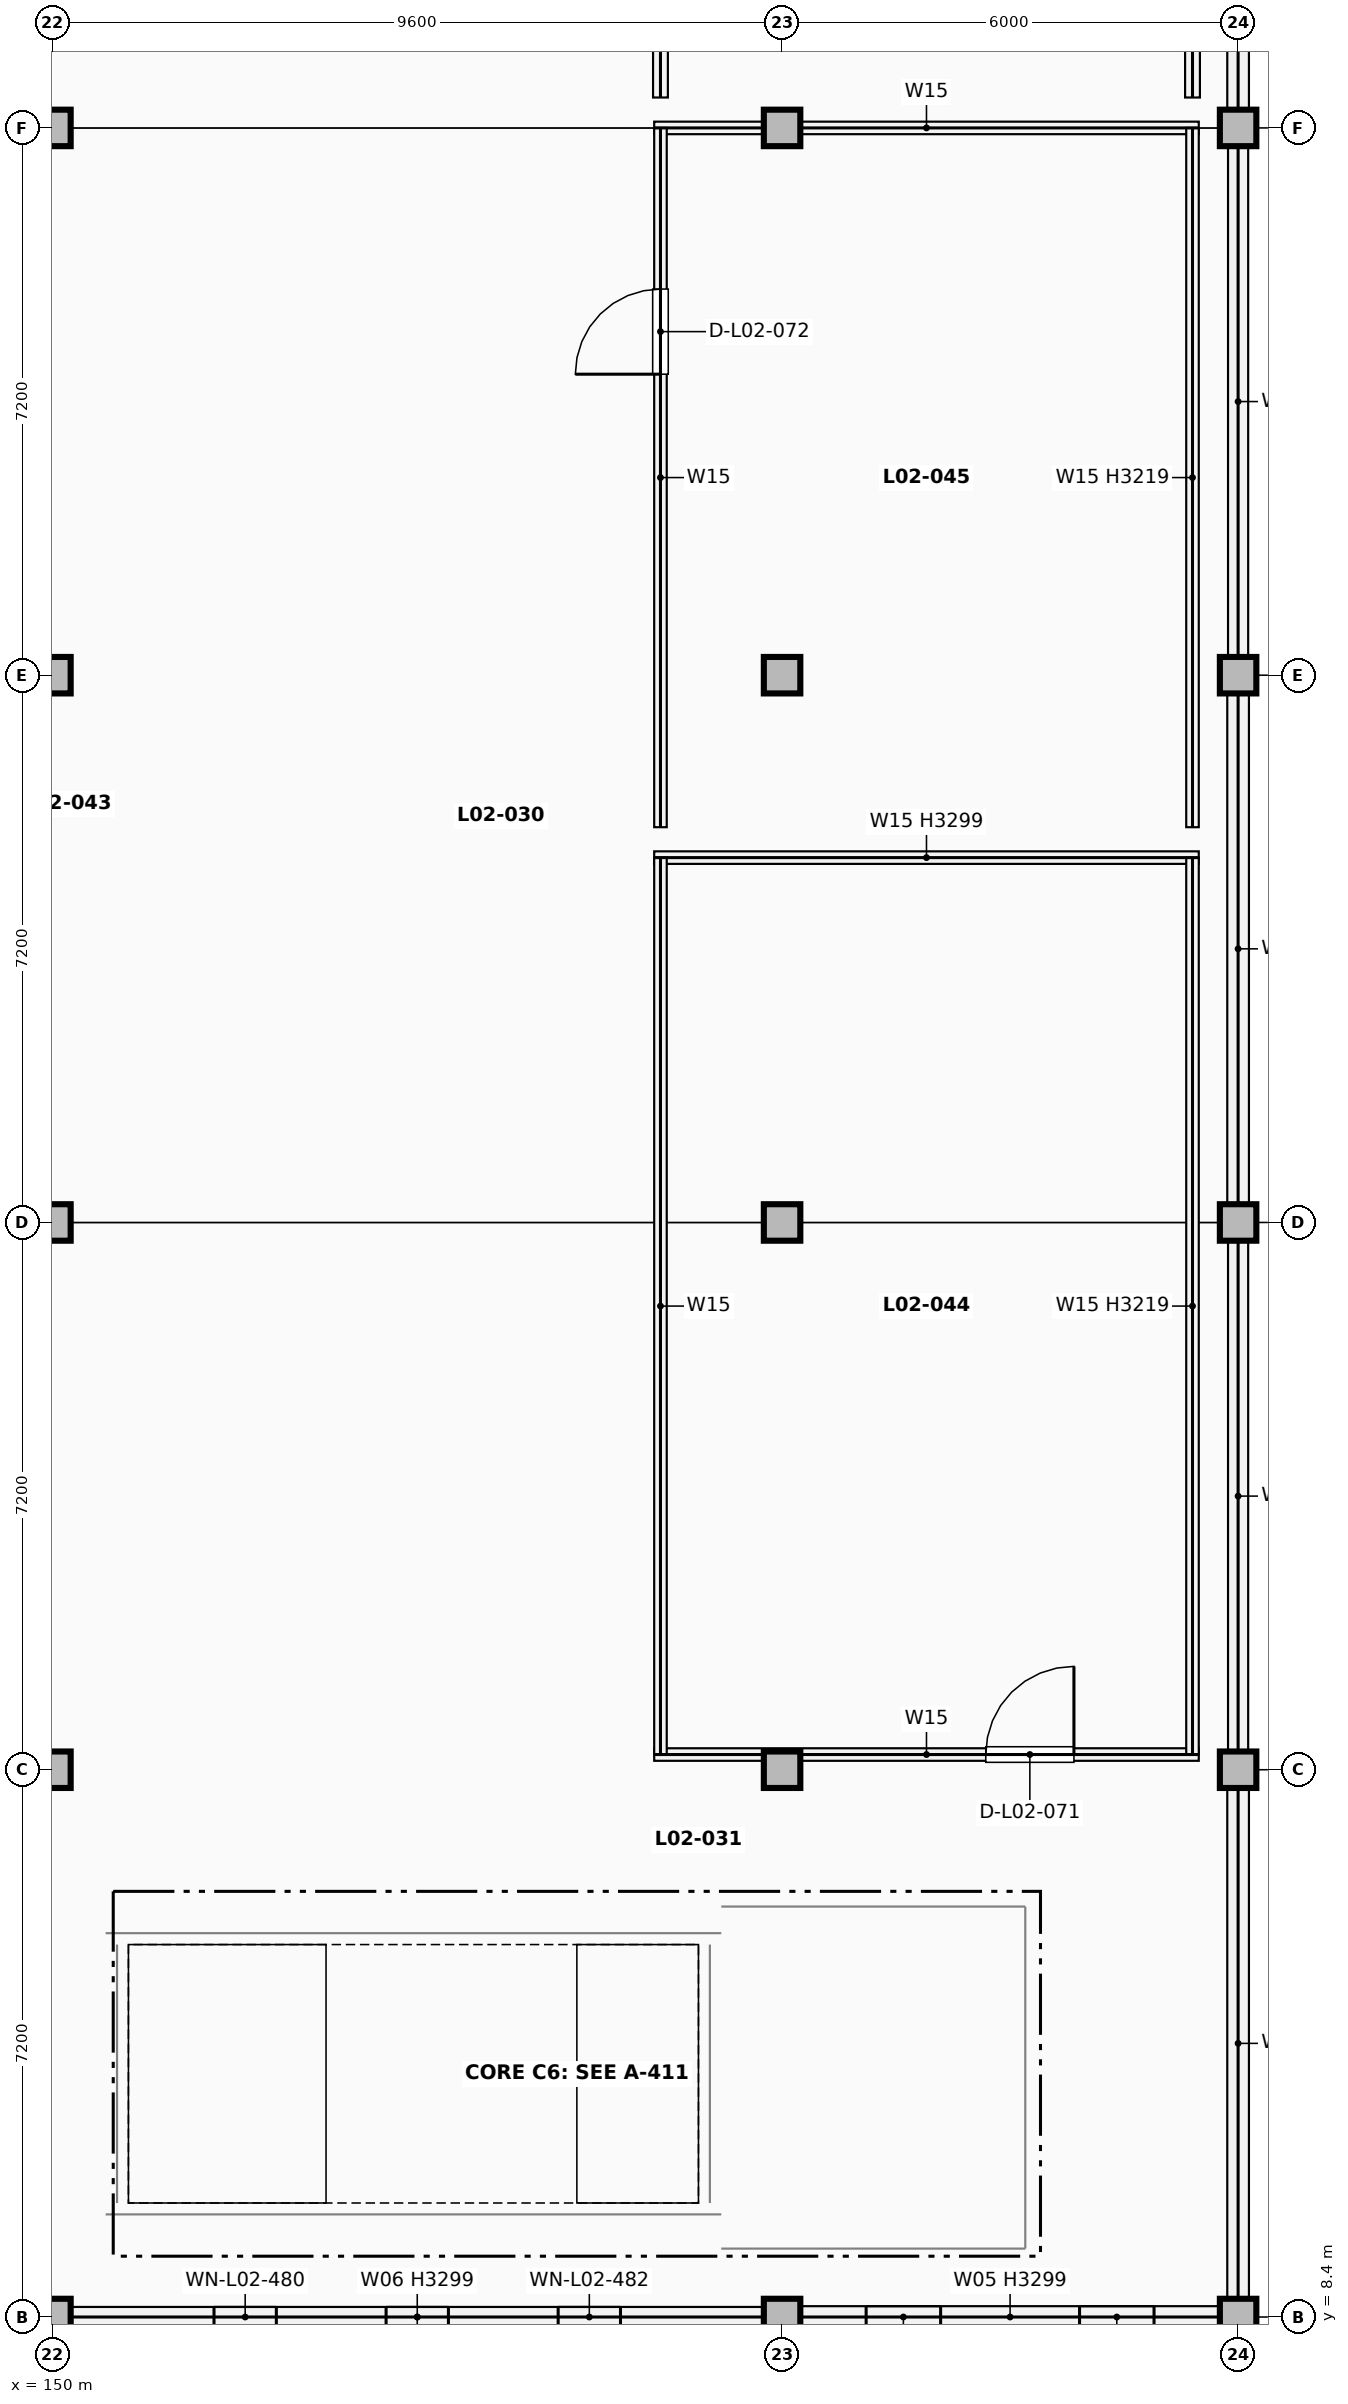
"""IFC4 building model, lengths in metres.
Left out: names, types, materials, properties, quantities, classifications, styles, units other than length and angle.
Written with IfcOpenShell. Run it as: python <this file> out.ifc"""

import sys

from ifc_helpers import new_model, si_unit, direction, frame, frame_2d, origin, origin_2d, place, context, subcontext, project, spatial, rectangle, extrude, element, fill, save


model = new_model("IFC4")
c1 = context("Model", 3, precision=1e-05, world=origin(), true_north=direction((0.0, 1.0)))
c2 = subcontext(c1, "Body", "Model", "MODEL_VIEW")
j1 = project(units=[si_unit("LENGTHUNIT", "METRE"), si_unit("PLANEANGLEUNIT", "RADIAN")], contexts=[c1])
p1 = place(None, origin())
s1 = spatial("IfcSite", under=j1, at=p1, CompositionType="ELEMENT")
p2 = place(p1, origin())
s2 = spatial("IfcBuilding", under=s1, at=p2, CompositionType="ELEMENT")
p3 = place(p2, frame((0.0, 0.0, 9.52)))
s3 = spatial("IfcBuildingStorey", under=s2, at=p3, CompositionType="ELEMENT", Elevation=9.52)
for number, where, z_axis, x_axis in (
    (1, (150.0, 8.4, 0.0), (0.0, 0.0, 1.0), (1.0, 0.0, 0.0)),
    (2, (150.0, 15.6, 0.0), (0.0, 0.0, 1.0), (1.0, 0.0, 0.0)),
    (3, (150.0, 22.8, 0.0), (0.0, 0.0, 1.0), (1.0, 0.0, 0.0)),
    (4, (150.0, 30.0, 0.0), (0.0, 0.0, 1.0), (1.0, 0.0, 0.0)),
    (5, (150.0, 37.2, 0.0), (0.0, 0.0, 1.0), (1.0, 0.0, 0.0)),
    (6, (159.6, 8.4, 0.0), (0.0, 0.0, 1.0), (1.0, 0.0, 0.0)),
    (7, (159.6, 15.6, 0.0), (0.0, 0.0, 1.0), (1.0, 0.0, 0.0)),
    (8, (159.6, 22.8, 0.0), (0.0, 0.0, 1.0), (1.0, 0.0, 0.0)),
    (9, (159.6, 30.0, 0.0), (0.0, 0.0, 1.0), (1.0, 0.0, 0.0)),
    (10, (159.6, 37.2, 0.0), (0.0, 0.0, 1.0), (1.0, 0.0, 0.0)),
    (11, (165.6, 8.4, 0.0), (0.0, 0.0, 1.0), (1.0, 0.0, 0.0)),
    (12, (165.6, 15.6, 0.0), (0.0, 0.0, 1.0), (1.0, 0.0, 0.0)),
    (13, (165.6, 22.8, 0.0), (0.0, 0.0, 1.0), (1.0, 0.0, 0.0)),
    (14, (165.6, 30.0, 0.0), (0.0, 0.0, 1.0), (1.0, 0.0, 0.0)),
    (15, (165.6, 37.2, 0.0), (0.0, 0.0, 1.0), (1.0, 0.0, 0.0)),
):
    element("IfcColumn", number, at=place(p3, frame(where, z_axis=z_axis, x_axis=x_axis)), inside=s3, PredefinedType="COLUMN", context=c2, shape_type="SweptSolid", body=[
        extrude(rectangle(XDim=0.48, YDim=0.48, at=origin_2d()), origin(), (0.0, 0.0, 1.0), 4.08),
    ])
p4 = place(p3, frame((165.6, 8.642, 0.0), z_axis=(0.0, 0.0, 1.0), x_axis=(0.0, 1.0, 0.0)))
e16 = element("IfcWall", 16, at=p4, inside=s3, PredefinedType="SOLIDWALL", context=c2, shape_type="SweptSolid", body=[
    extrude(rectangle(XDim=6.716, YDim=0.285, at=frame_2d((3.358, 0.0))), origin(), (0.0, 0.0, 1.0), 3.219),
])
p5 = place(p3, frame((165.6, 15.842, 0.0), z_axis=(0.0, 0.0, 1.0), x_axis=(0.0, 1.0, 0.0)))
e17 = element("IfcWall", 17, at=p5, inside=s3, PredefinedType="SOLIDWALL", context=c2, shape_type="SweptSolid", body=[
    extrude(rectangle(XDim=6.716, YDim=0.265, at=frame_2d((3.358, 0.0))), origin(), (0.0, 0.0, 1.0), 3.219),
])
p6 = place(p3, frame((165.6, 23.042, 0.0), z_axis=(0.0, 0.0, 1.0), x_axis=(0.0, 1.0, 0.0)))
e18 = element("IfcWall", 18, at=p6, inside=s3, PredefinedType="SOLIDWALL", context=c2, shape_type="SweptSolid", body=[
    extrude(rectangle(XDim=6.716, YDim=0.285, at=frame_2d((3.358, 0.0))), origin(), (0.0, 0.0, 1.0), 3.219),
])
p7 = place(p3, frame((165.6, 30.242, 0.0), z_axis=(0.0, 0.0, 1.0), x_axis=(0.0, 1.0, 0.0)))
e19 = element("IfcWall", 19, at=p7, inside=s3, PredefinedType="SOLIDWALL", context=c2, shape_type="SweptSolid", body=[
    extrude(rectangle(XDim=6.716, YDim=0.265, at=frame_2d((3.358, 0.0))), origin(), (0.0, 0.0, 1.0), 3.219),
])
p8 = place(p3, frame((165.6, 37.442, 0.0), z_axis=(0.0, 0.0, 1.0), x_axis=(0.0, 1.0, 0.0)))
e20 = element("IfcWall", 20, at=p8, inside=s3, PredefinedType="SOLIDWALL", context=c2, shape_type="SweptSolid", body=[
    extrude(rectangle(XDim=6.716, YDim=0.285, at=frame_2d((3.358, 0.0))), origin(), (0.0, 0.0, 1.0), 3.219),
])
p9 = place(p3, frame((150.242, 8.4, 0.0), z_axis=(0.0, 0.0, 1.0), x_axis=(1.0, 0.0, 0.0)))
e21 = element("IfcWall", 21, at=p9, inside=s3, PredefinedType="SOLIDWALL", context=c2, shape_type="SweptSolid", body=[
    extrude(rectangle(XDim=9.116, YDim=0.265, at=frame_2d((4.558, 0.0))), origin(), (0.0, 0.0, 1.0), 3.299),
])
p10 = place(p9, frame((1.884, 0.0, 0.75)))
e22 = element("IfcOpeningElement", 22, at=p10, cuts=e21, PredefinedType="OPENING", context=c2, shape_type="SweptSolid", body=[
    extrude(rectangle(XDim=0.82, YDim=2.22, at=frame_2d((0.41, 1.11))), frame((0.0, 0.143, 0.0), z_axis=(0.0, -1.0, 0.0), x_axis=(1.0, 0.0, 0.0)), (0.0, 0.0, 1.0), 0.285),
])
p11 = place(p9, frame((4.148, 0.0, 0.75)))
e23 = element("IfcOpeningElement", 23, at=p11, cuts=e21, PredefinedType="OPENING", context=c2, shape_type="SweptSolid", body=[
    extrude(rectangle(XDim=0.82, YDim=2.22, at=frame_2d((0.41, 1.11))), frame((0.0, 0.143, 0.0), z_axis=(0.0, -1.0, 0.0), x_axis=(1.0, 0.0, 0.0)), (0.0, 0.0, 1.0), 0.285),
])
p12 = place(p9, frame((6.412, 0.0, 0.75)))
e24 = element("IfcOpeningElement", 24, at=p12, cuts=e21, PredefinedType="OPENING", context=c2, shape_type="SweptSolid", body=[
    extrude(rectangle(XDim=0.82, YDim=2.22, at=frame_2d((0.41, 1.11))), frame((0.0, 0.143, 0.0), z_axis=(0.0, -1.0, 0.0), x_axis=(1.0, 0.0, 0.0)), (0.0, 0.0, 1.0), 0.285),
])
p13 = place(p3, frame((159.842, 8.4, 0.0), z_axis=(0.0, 0.0, 1.0), x_axis=(1.0, 0.0, 0.0)))
e25 = element("IfcWall", 25, at=p13, inside=s3, PredefinedType="SOLIDWALL", context=c2, shape_type="SweptSolid", body=[
    extrude(rectangle(XDim=5.516, YDim=0.285, at=frame_2d((2.758, 0.0))), origin(), (0.0, 0.0, 1.0), 3.299),
])
p14 = place(p13, frame((0.864, 0.0, 0.75)))
e26 = element("IfcOpeningElement", 26, at=p14, cuts=e25, PredefinedType="OPENING", context=c2, shape_type="SweptSolid", body=[
    extrude(rectangle(XDim=0.98, YDim=2.28, at=frame_2d((0.49, 1.14))), frame((0.0, 0.152, 0.0), z_axis=(0.0, -1.0, 0.0), x_axis=(1.0, 0.0, 0.0)), (0.0, 0.0, 1.0), 0.305),
])
p15 = place(p13, frame((3.672, 0.0, 0.75)))
e27 = element("IfcOpeningElement", 27, at=p15, cuts=e25, PredefinedType="OPENING", context=c2, shape_type="SweptSolid", body=[
    extrude(rectangle(XDim=0.98, YDim=2.28, at=frame_2d((0.49, 1.14))), frame((0.0, 0.152, 0.0), z_axis=(0.0, -1.0, 0.0), x_axis=(1.0, 0.0, 0.0)), (0.0, 0.0, 1.0), 0.305),
])
p16 = place(p3, frame((150.85, 9.9, 0.0), z_axis=(0.0, 0.0, 1.0), x_axis=(0.0, 1.0, 0.0)))
e28 = element("IfcWall", 28, at=p16, inside=s3, PredefinedType="SHEAR", context=c2, shape_type="SweptSolid", body=[
    extrude(rectangle(XDim=3.4, YDim=0.3, at=frame_2d((1.7, 0.0))), origin(), (0.0, 0.0, 1.0), 4.08),
])
for number, where, z_axis, x_axis in (
    (29, (150.7, 9.75, 0.0), (0.0, 0.0, 1.0), (1.0, 0.0, 0.0)),
    (30, (150.7, 13.45, 0.0), (0.0, 0.0, 1.0), (1.0, 0.0, 0.0)),
):
    element("IfcWall", number, at=place(p3, frame(where, z_axis=z_axis, x_axis=x_axis)), inside=s3, PredefinedType="SHEAR", context=c2, shape_type="SweptSolid", body=[
        extrude(rectangle(XDim=8.1, YDim=0.3, at=frame_2d((4.05, 0.0))), origin(), (0.0, 0.0, 1.0), 4.08),
    ])
p17 = place(p3, frame((158.65, 9.9, 0.0), z_axis=(0.0, 0.0, 1.0), x_axis=(0.0, 1.0, 0.0)))
e31 = element("IfcWall", 31, at=p17, inside=s3, PredefinedType="SHEAR", context=c2, shape_type="SweptSolid", body=[
    extrude(rectangle(XDim=3.4, YDim=0.3, at=frame_2d((1.7, 0.0))), origin(), (0.0, 0.0, 1.0), 4.08),
])
p18 = place(p17, frame((1.1, 0.0, 0.0)))
e32 = element("IfcOpeningElement", 32, at=p18, cuts=e31, PredefinedType="OPENING", context=c2, shape_type="SweptSolid", body=[
    extrude(rectangle(XDim=1.2, YDim=2.2, at=frame_2d((0.6, 1.1))), frame((0.0, 0.16, 0.0), z_axis=(0.0, -1.0, 0.0), x_axis=(1.0, 0.0, 0.0)), (0.0, 0.0, 1.0), 0.32),
])
p19 = place(p3, frame((162.8, 9.3, 0.0), z_axis=(0.0, 0.0, 1.0), x_axis=(0.0, 1.0, 0.0)))
e33 = element("IfcWall", 33, at=p19, inside=s3, PredefinedType="PARTITIONING", context=c2, shape_type="SweptSolid", body=[
    extrude(rectangle(XDim=4.5, YDim=0.2, at=frame_2d((2.25, 0.0))), origin(), (0.0, 0.0, 1.0), 3.299),
])
p20 = place(p3, frame((158.8, 9.3, 0.0), z_axis=(0.0, 0.0, 1.0), x_axis=(1.0, 0.0, 0.0)))
e34 = element("IfcWall", 34, at=p20, inside=s3, PredefinedType="PARTITIONING", context=c2, shape_type="SweptSolid", body=[
    extrude(rectangle(XDim=4.0, YDim=0.2, at=frame_2d((2.0, 0.0))), origin(), (0.0, 0.0, 1.0), 3.299),
])
p21 = place(p3, frame((158.8, 13.8, 0.0), z_axis=(0.0, 0.0, 1.0), x_axis=(1.0, 0.0, 0.0)))
e35 = element("IfcWall", 35, at=p21, inside=s3, PredefinedType="PARTITIONING", context=c2, shape_type="SweptSolid", body=[
    extrude(rectangle(XDim=4.0, YDim=0.2, at=frame_2d((2.0, 0.0))), origin(), (0.0, 0.0, 1.0), 3.299),
])
p22 = place(p21, frame((1.275, 0.0, 0.0)))
e36 = element("IfcOpeningElement", 36, at=p22, cuts=e35, PredefinedType="OPENING", context=c2, shape_type="SweptSolid", body=[
    extrude(rectangle(XDim=1.45, YDim=2.2, at=frame_2d((0.725, 1.1))), frame((0.0, 0.11, 0.0), z_axis=(0.0, -1.0, 0.0), x_axis=(1.0, 0.0, 0.0)), (0.0, 0.0, 1.0), 0.22),
])
p23 = place(p3, frame((157.917, 15.8, 0.0), z_axis=(0.0, 0.0, 1.0), x_axis=(1.0, 0.0, 0.0)))
e37 = element("IfcWall", 37, at=p23, inside=s3, PredefinedType="PARTITIONING", context=c2, shape_type="SweptSolid", body=[
    extrude(rectangle(XDim=7.165, YDim=0.165, at=frame_2d((3.583, 0.0))), origin(), (0.0, 0.0, 1.0), 2.979),
])
p24 = place(p23, frame((4.363, 0.0, 0.0)))
e38 = element("IfcOpeningElement", 38, at=p24, cuts=e37, PredefinedType="OPENING", context=c2, shape_type="SweptSolid", body=[
    extrude(rectangle(XDim=1.16, YDim=2.22, at=frame_2d((0.58, 1.11))), frame((0.0, 0.093, 0.0), z_axis=(0.0, -1.0, 0.0), x_axis=(1.0, 0.0, 0.0)), (0.0, 0.0, 1.0), 0.185),
])
p25 = place(p3, frame((157.917, 27.6, 0.0), z_axis=(0.0, 0.0, 1.0), x_axis=(1.0, 0.0, 0.0)))
e39 = element("IfcWall", 39, at=p25, inside=s3, PredefinedType="PARTITIONING", context=c2, shape_type="SweptSolid", body=[
    extrude(rectangle(XDim=7.165, YDim=0.165, at=frame_2d((3.583, 0.0))), origin(), (0.0, 0.0, 1.0), 3.299),
])
p26 = place(p3, frame((158.0, 15.8, 0.0), z_axis=(0.0, 0.0, 1.0), x_axis=(0.0, 1.0, 0.0)))
e40 = element("IfcWall", 40, at=p26, inside=s3, PredefinedType="PARTITIONING", context=c2, shape_type="SweptSolid", body=[
    extrude(rectangle(XDim=11.8, YDim=0.165, at=frame_2d((5.9, 0.0))), origin(), (0.0, 0.0, 1.0), 2.979),
])
p27 = place(p3, frame((165.0, 15.8, 0.0), z_axis=(0.0, 0.0, 1.0), x_axis=(0.0, 1.0, 0.0)))
e41 = element("IfcWall", 41, at=p27, inside=s3, PredefinedType="PARTITIONING", context=c2, shape_type="SweptSolid", body=[
    extrude(rectangle(XDim=11.8, YDim=0.165, at=frame_2d((5.9, 0.0))), origin(), (0.0, 0.0, 1.0), 3.219),
])
p28 = place(p3, frame((157.917, 37.2, 0.0), z_axis=(0.0, 0.0, 1.0), x_axis=(1.0, 0.0, 0.0)))
e42 = element("IfcWall", 42, at=p28, inside=s3, PredefinedType="PARTITIONING", context=c2, shape_type="SweptSolid", body=[
    extrude(rectangle(XDim=7.165, YDim=0.165, at=frame_2d((3.583, 0.0))), origin(), (0.0, 0.0, 1.0), 2.979),
])
p29 = place(p3, frame((158.0, 28.0, 0.0), z_axis=(0.0, 0.0, 1.0), x_axis=(0.0, 1.0, 0.0)))
e43 = element("IfcWall", 43, at=p29, inside=s3, PredefinedType="PARTITIONING", context=c2, shape_type="SweptSolid", body=[
    extrude(rectangle(XDim=9.2, YDim=0.165, at=frame_2d((4.6, 0.0))), origin(), (0.0, 0.0, 1.0), 2.979),
])
p30 = place(p29, frame((5.96, 0.0, 0.0)))
e44 = element("IfcOpeningElement", 44, at=p30, cuts=e43, PredefinedType="OPENING", context=c2, shape_type="SweptSolid", body=[
    extrude(rectangle(XDim=1.12, YDim=2.22, at=frame_2d((0.56, 1.11))), frame((0.0, 0.093, 0.0), z_axis=(0.0, -1.0, 0.0), x_axis=(1.0, 0.0, 0.0)), (0.0, 0.0, 1.0), 0.185),
])
p31 = place(p3, frame((165.0, 28.0, 0.0), z_axis=(0.0, 0.0, 1.0), x_axis=(0.0, 1.0, 0.0)))
e45 = element("IfcWall", 45, at=p31, inside=s3, PredefinedType="PARTITIONING", context=c2, shape_type="SweptSolid", body=[
    extrude(rectangle(XDim=9.2, YDim=0.165, at=frame_2d((4.6, 0.0))), origin(), (0.0, 0.0, 1.0), 3.219),
])
p32 = place(p3, frame((158.0, 37.6, 0.0), z_axis=(0.0, 0.0, 1.0), x_axis=(0.0, 1.0, 0.0)))
e46 = element("IfcWall", 46, at=p32, inside=s3, PredefinedType="PARTITIONING", context=c2, shape_type="SweptSolid", body=[
    extrude(rectangle(XDim=6.4, YDim=0.195, at=frame_2d((3.2, 0.0))), origin(), (0.0, 0.0, 1.0), 3.754),
])
p33 = place(p32, frame((2.675, 0.0, 0.0)))
e47 = element("IfcOpeningElement", 47, at=p33, cuts=e46, PredefinedType="OPENING", context=c2, shape_type="SweptSolid", body=[
    extrude(rectangle(XDim=1.05, YDim=2.15, at=frame_2d((0.525, 1.075))), frame((0.0, 0.107, 0.0), z_axis=(0.0, -1.0, 0.0), x_axis=(1.0, 0.0, 0.0)), (0.0, 0.0, 1.0), 0.215),
])
p34 = place(p3, frame((165.0, 37.6, 0.0), z_axis=(0.0, 0.0, 1.0), x_axis=(0.0, 1.0, 0.0)))
e48 = element("IfcWall", 48, at=p34, inside=s3, PredefinedType="PARTITIONING", context=c2, shape_type="SweptSolid", body=[
    extrude(rectangle(XDim=6.4, YDim=0.195, at=frame_2d((3.2, 0.0))), origin(), (0.0, 0.0, 1.0), 3.754),
])
p35 = place(p10, origin())
e49 = element("IfcWindow", 49, at=p35, inside=s3, PartitioningType="SINGLE_PANEL", PredefinedType="WINDOW", context=c2, shape_type="SweptSolid", body=[
    extrude(rectangle(XDim=0.82, YDim=2.22, at=frame_2d((0.41, 1.11))), frame((0.0, 0.03, 0.0), z_axis=(0.0, -1.0, 0.0), x_axis=(1.0, 0.0, 0.0)), (0.0, 0.0, 1.0), 0.06),
])
fill(e22, e49)
p36 = place(p11, origin())
e50 = element("IfcWindow", 50, at=p36, inside=s3, PartitioningType="SINGLE_PANEL", PredefinedType="WINDOW", context=c2, shape_type="SweptSolid", body=[
    extrude(rectangle(XDim=0.82, YDim=2.22, at=frame_2d((0.41, 1.11))), frame((0.0, 0.03, 0.0), z_axis=(0.0, -1.0, 0.0), x_axis=(1.0, 0.0, 0.0)), (0.0, 0.0, 1.0), 0.06),
])
fill(e23, e50)
p37 = place(p12, origin())
e51 = element("IfcWindow", 51, at=p37, inside=s3, PartitioningType="SINGLE_PANEL", PredefinedType="WINDOW", context=c2, shape_type="SweptSolid", body=[
    extrude(rectangle(XDim=0.82, YDim=2.22, at=frame_2d((0.41, 1.11))), frame((0.0, 0.03, 0.0), z_axis=(0.0, -1.0, 0.0), x_axis=(1.0, 0.0, 0.0)), (0.0, 0.0, 1.0), 0.06),
])
fill(e24, e51)
p38 = place(p14, origin())
e52 = element("IfcWindow", 52, at=p38, inside=s3, PartitioningType="SINGLE_PANEL", PredefinedType="WINDOW", context=c2, shape_type="SweptSolid", body=[
    extrude(rectangle(XDim=0.98, YDim=2.28, at=frame_2d((0.49, 1.14))), frame((0.0, 0.03, 0.0), z_axis=(0.0, -1.0, 0.0), x_axis=(1.0, 0.0, 0.0)), (0.0, 0.0, 1.0), 0.06),
])
fill(e26, e52)
p39 = place(p15, origin())
e53 = element("IfcWindow", 53, at=p39, inside=s3, PartitioningType="SINGLE_PANEL", PredefinedType="WINDOW", context=c2, shape_type="SweptSolid", body=[
    extrude(rectangle(XDim=0.98, YDim=2.28, at=frame_2d((0.49, 1.14))), frame((0.0, 0.03, 0.0), z_axis=(0.0, -1.0, 0.0), x_axis=(1.0, 0.0, 0.0)), (0.0, 0.0, 1.0), 0.06),
])
fill(e27, e53)
p40 = place(p18, origin())
e54 = element("IfcDoor", 54, at=p40, inside=s3, OperationType="SINGLE_SWING_RIGHT", PredefinedType="DOOR", context=c2, shape_type="SweptSolid", body=[
    extrude(rectangle(XDim=1.2, YDim=2.2, at=frame_2d((0.6, 1.1))), frame((0.0, 0.025, 0.0), z_axis=(0.0, -1.0, 0.0), x_axis=(1.0, 0.0, 0.0)), (0.0, 0.0, 1.0), 0.05),
])
fill(e32, e54)
p41 = place(p22, origin())
e55 = element("IfcDoor", 55, at=p41, inside=s3, OperationType="DOUBLE_DOOR_SINGLE_SWING", PredefinedType="DOOR", context=c2, shape_type="SweptSolid", body=[
    extrude(rectangle(XDim=1.45, YDim=2.2, at=frame_2d((0.725, 1.1))), frame((0.0, 0.025, 0.0), z_axis=(0.0, -1.0, 0.0), x_axis=(1.0, 0.0, 0.0)), (0.0, 0.0, 1.0), 0.05),
])
fill(e36, e55)
p42 = place(p24, origin())
e56 = element("IfcDoor", 56, at=p42, inside=s3, OperationType="SINGLE_SWING_RIGHT", PredefinedType="DOOR", context=c2, shape_type="SweptSolid", body=[
    extrude(rectangle(XDim=1.16, YDim=2.22, at=frame_2d((0.58, 1.11))), frame((0.0, 0.025, 0.0), z_axis=(0.0, -1.0, 0.0), x_axis=(1.0, 0.0, 0.0)), (0.0, 0.0, 1.0), 0.05),
])
fill(e38, e56)
p43 = place(p30, origin())
e57 = element("IfcDoor", 57, at=p43, inside=s3, OperationType="SINGLE_SWING_LEFT", PredefinedType="DOOR", context=c2, shape_type="SweptSolid", body=[
    extrude(rectangle(XDim=1.12, YDim=2.22, at=frame_2d((0.56, 1.11))), frame((0.0, 0.025, 0.0), z_axis=(0.0, -1.0, 0.0), x_axis=(1.0, 0.0, 0.0)), (0.0, 0.0, 1.0), 0.05),
])
fill(e44, e57)
save(model, sys.argv[1])
